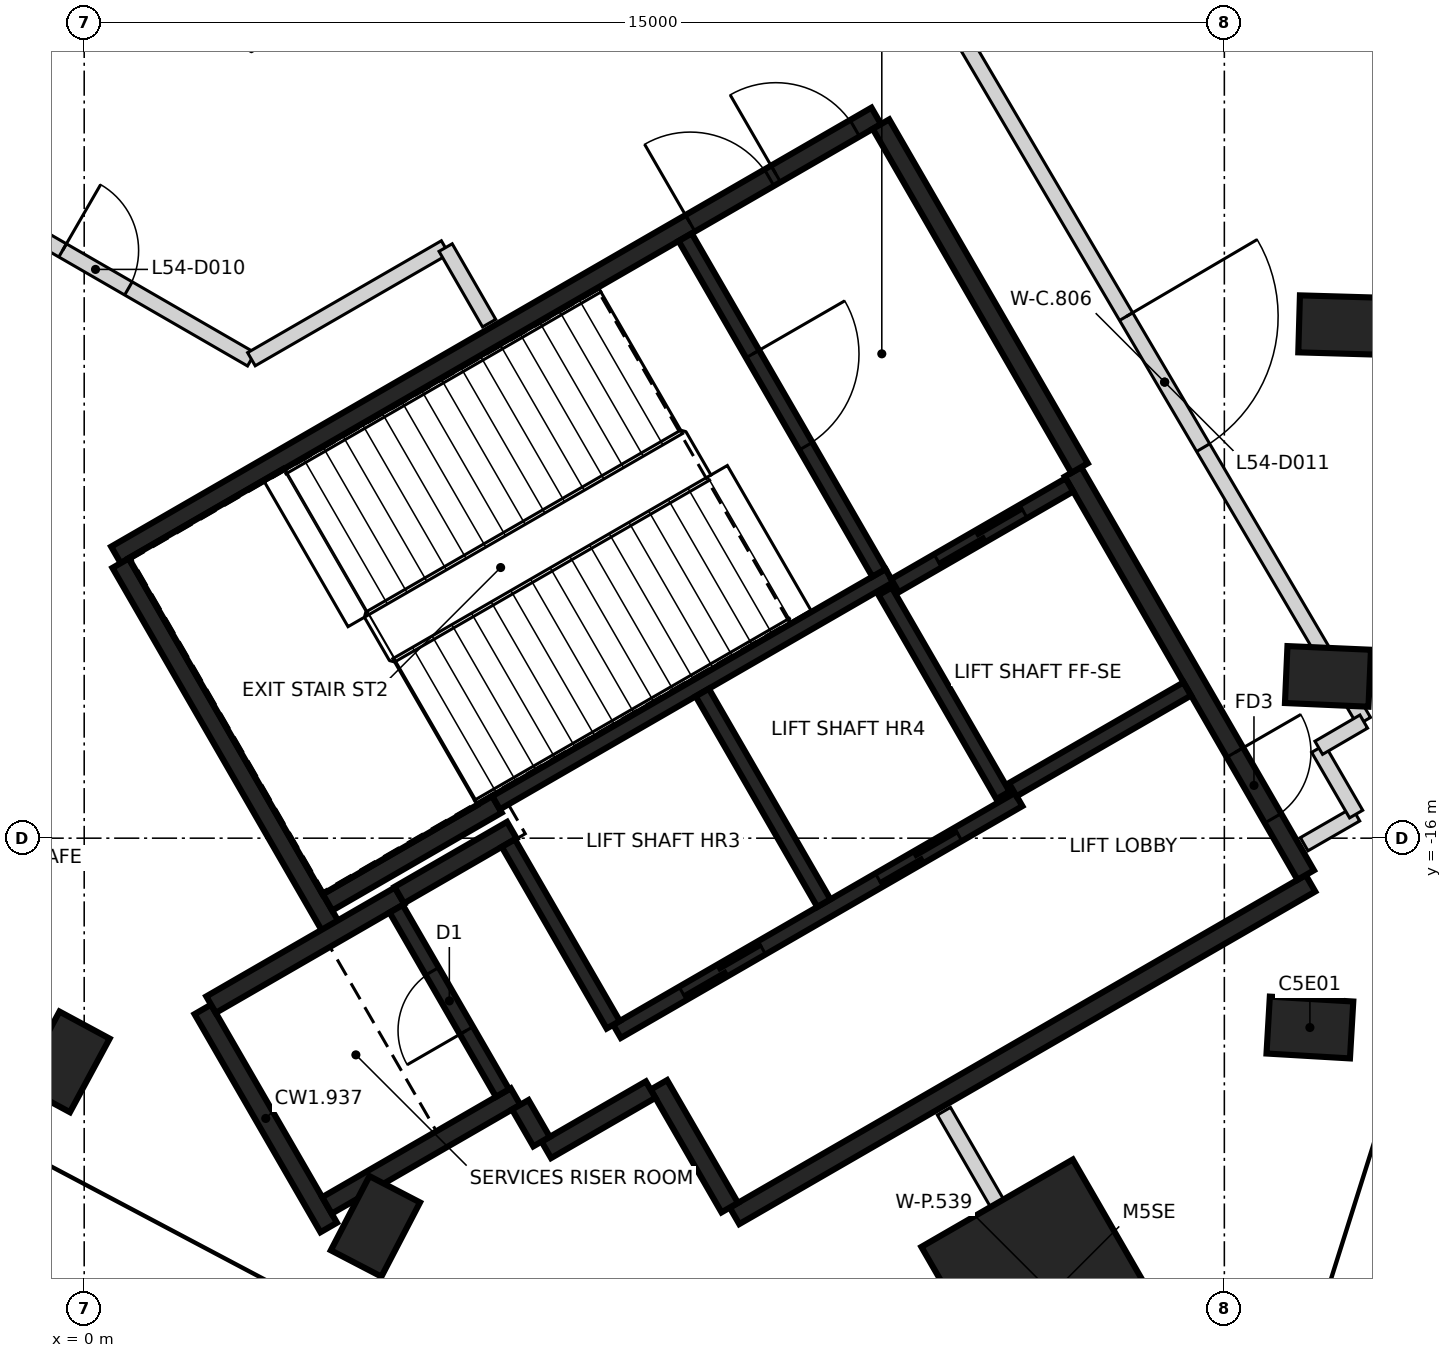
"""IFC4 building model, lengths in metres.
Left out: names, types, materials, properties, quantities, classifications, styles, units other than length and angle.
Written with IfcOpenShell. Run it as: python <this file> out.ifc"""

import sys

from ifc_helpers import new_model, si_unit, direction, frame, frame_2d, origin, origin_2d, place, context, subcontext, project, spatial, rectangle, extrude, element, fill, save


model = new_model("IFC4")
c1 = context("Model", 3, precision=1e-05, world=origin(), true_north=direction((0.0, 1.0)))
c2 = subcontext(c1, "Body", "Model", "MODEL_VIEW")
j1 = project(units=[si_unit("LENGTHUNIT", "METRE"), si_unit("PLANEANGLEUNIT", "RADIAN")], contexts=[c1])
p1 = place(None, origin())
s1 = spatial("IfcSite", under=j1, at=p1, CompositionType="ELEMENT")
p2 = place(p1, origin())
s2 = spatial("IfcBuilding", under=s1, at=p2, CompositionType="ELEMENT")
p3 = place(p2, frame((0.0, 0.0, 216.4)))
s3 = spatial("IfcBuildingStorey", under=s2, at=p3, CompositionType="ELEMENT", Elevation=216.4)
for number, where, z_axis, x_axis in (
    (1, (16.125, -18.491, -0.35), (0.0, 0.0, 1.0), (-0.998, 0.058, 0.0)),
    (2, (16.363, -13.872, -0.35), (0.0, 0.0, 1.0), (-0.999, 0.044, 0.0)),
    (3, (16.533, -9.25, -0.35), (0.0, 0.0, 1.0), (-1.0, 0.029, 0.0)),
    (4, (-0.256, -18.943, -0.35), (0.0, 0.0, 1.0), (0.475, 0.88, 0.0)),
    (5, (3.832, -21.107, -0.35), (0.0, 0.0, 1.0), (0.461, 0.887, 0.0)),
):
    element("IfcColumn", number, at=place(p3, frame(where, z_axis=z_axis, x_axis=x_axis)), inside=s3, PredefinedType="COLUMN", context=c2, shape_type="SweptSolid", body=[
        extrude(rectangle(XDim=1.1, YDim=0.75, at=origin_2d()), origin(), (0.0, 0.0, 1.0), 5.0),
    ])
p4 = place(p3, frame((12.71, -22.015, -0.35), z_axis=(0.0, 0.0, 1.0), x_axis=(-0.5, 0.866025403784, 0.0)))
e6 = element("IfcColumn", 6, at=p4, inside=s3, PredefinedType="COLUMN", context=c2, shape_type="SweptSolid", body=[
    extrude(rectangle(XDim=2.8, YDim=2.3, at=origin_2d()), origin(), (0.0, 0.0, 1.0), 5.0),
])
p5 = place(p3, frame((0.417, -12.273, 0.0), z_axis=(0.0, 0.0, 1.0), x_axis=(0.866021906294, 0.500006057782, 0.0)))
e7 = element("IfcWall", 7, at=p5, inside=s3, PredefinedType="SHEAR", context=c2, shape_type="SweptSolid", body=[
    extrude(rectangle(XDim=11.55, YDim=0.25, at=frame_2d((5.775, 0.0))), origin(), (0.0, 0.0, 1.0), 4.65),
])
p6 = place(p5, frame((10.025, 0.0, 0.0)))
e8 = element("IfcOpeningElement", 8, at=p6, cuts=e7, PredefinedType="OPENING", context=c2, shape_type="SweptSolid", body=[
    extrude(rectangle(XDim=1.2, YDim=2.1, at=frame_2d((0.6, 1.05))), frame((0.0, 0.135, 0.0), z_axis=(0.0, -1.0, 0.0), x_axis=(1.0, 0.0, 0.0)), (0.0, 0.0, 1.0), 0.27),
])
p7 = place(p5, frame((8.725, 0.0, 0.0)))
e9 = element("IfcOpeningElement", 9, at=p7, cuts=e7, PredefinedType="OPENING", context=c2, shape_type="SweptSolid", body=[
    extrude(rectangle(XDim=1.2, YDim=2.1, at=frame_2d((0.6, 1.05))), frame((0.0, 0.135, 0.0), z_axis=(0.0, -1.0, 0.0), x_axis=(1.0, 0.0, 0.0)), (0.0, 0.0, 1.0), 0.27),
])
p8 = place(p3, frame((16.133, -16.594, 0.0), z_axis=(0.0, 0.0, 1.0), x_axis=(-0.866022959057, -0.500004234368, 0.0)))
e10 = element("IfcWall", 10, at=p8, inside=s3, PredefinedType="SHEAR", context=c2, shape_type="SweptSolid", body=[
    extrude(rectangle(XDim=8.75, YDim=0.25, at=frame_2d((4.375, 0.0))), origin(), (0.0, 0.0, 1.0), 4.65),
])
p9 = place(p3, frame((13.008, -11.181, 0.0), z_axis=(0.0, 0.0, 1.0), x_axis=(0.500001955336, -0.866024274868, 0.0)))
e11 = element("IfcWall", 11, at=p9, inside=s3, PredefinedType="SHEAR", context=c2, shape_type="SweptSolid", body=[
    extrude(rectangle(XDim=6.125, YDim=0.25, at=frame_2d((3.062, 0.0))), origin(), (0.0, 0.0, 1.0), 4.65),
])
p10 = place(p9, frame((4.263, 0.0, 0.0)))
e12 = element("IfcOpeningElement", 12, at=p10, cuts=e11, PredefinedType="OPENING", context=c2, shape_type="SweptSolid", body=[
    extrude(rectangle(XDim=1.0, YDim=2.1, at=frame_2d((0.5, 1.05))), frame((0.0, 0.135, 0.0), z_axis=(0.0, -1.0, 0.0), x_axis=(1.0, 0.0, 0.0)), (0.0, 0.0, 1.0), 0.27),
])
p11 = place(p3, frame((3.235, -17.153, 0.0), z_axis=(0.0, 0.0, 1.0), x_axis=(-0.500008851346, 0.866020293397, 0.0)))
e13 = element("IfcWall", 13, at=p11, inside=s3, PredefinedType="SHEAR", context=c2, shape_type="SweptSolid", body=[
    extrude(rectangle(XDim=5.51, YDim=0.25, at=frame_2d((2.755, 0.0))), origin(), (0.0, 0.0, 1.0), 4.65),
])
p12 = place(p3, frame((10.483, -6.606, 0.0), z_axis=(0.0, 0.0, 1.0), x_axis=(0.49999885962, -0.866026062182, 0.0)))
e14 = element("IfcWall", 14, at=p12, inside=s3, PredefinedType="SHEAR", context=c2, shape_type="SweptSolid", body=[
    extrude(rectangle(XDim=5.225, YDim=0.25, at=frame_2d((2.612, 0.0))), origin(), (0.0, 0.0, 1.0), 4.65),
])
p13 = place(p3, frame((3.217, -21.122, 0.0), z_axis=(0.0, 0.0, 1.0), x_axis=(-0.499998874531, 0.866026053573, 0.0)))
e15 = element("IfcWall", 15, at=p13, inside=s3, PredefinedType="SHEAR", context=c2, shape_type="SweptSolid", body=[
    extrude(rectangle(XDim=3.313, YDim=0.25, at=frame_2d((1.656, 0.0))), origin(), (0.0, 0.0, 1.0), 4.65),
])
p14 = place(p3, frame((1.669, -18.19, 0.0), z_axis=(0.0, 0.0, 1.0), x_axis=(0.866042235819, 0.499970844928, 0.0)))
e16 = element("IfcWall", 16, at=p14, inside=s3, PredefinedType="SHEAR", context=c2, shape_type="SweptSolid", body=[
    extrude(rectangle(XDim=2.865, YDim=0.25, at=frame_2d((1.432, 0.0))), origin(), (0.0, 0.0, 1.0), 4.65),
])
p15 = place(p3, frame((5.675, -19.399, 0.0), z_axis=(0.0, 0.0, 1.0), x_axis=(-0.866026637627, -0.499997862916, 0.0)))
e17 = element("IfcWall", 17, at=p15, inside=s3, PredefinedType="SHEAR", context=c2, shape_type="SweptSolid", body=[
    extrude(rectangle(XDim=2.865, YDim=0.25, at=frame_2d((1.432, 0.0))), origin(), (0.0, 0.0, 1.0), 4.65),
])
p16 = place(p3, frame((5.431, -15.556, 0.0), z_axis=(0.0, 0.0, 1.0), x_axis=(-0.866022940537, -0.500004266446, 0.0)))
e18 = element("IfcWall", 18, at=p16, inside=s3, PredefinedType="SHEAR", context=c2, shape_type="SweptSolid", body=[
    extrude(rectangle(XDim=2.575, YDim=0.25, at=frame_2d((1.287, 0.0))), origin(), (0.0, 0.0, 1.0), 4.65),
])
p17 = place(p3, frame((8.493, -20.86, 0.0), z_axis=(0.0, 0.0, 1.0), x_axis=(-0.500039802285, 0.866002422705, 0.0)))
e19 = element("IfcWall", 19, at=p17, inside=s3, PredefinedType="SHEAR", context=c2, shape_type="SweptSolid", body=[
    extrude(rectangle(XDim=1.865, YDim=0.25, at=frame_2d((0.932, 0.0))), origin(), (0.0, 0.0, 1.0), 4.65),
])
p18 = place(p3, frame((4.145, -16.749, 0.0), z_axis=(0.0, 0.0, 1.0), x_axis=(0.866038183914, 0.499977863513, 0.0)))
e20 = element("IfcWall", 20, at=p18, inside=s3, PredefinedType="SHEAR", context=c2, shape_type="SweptSolid", body=[
    extrude(rectangle(XDim=1.71, YDim=0.25, at=frame_2d((0.855, 0.0))), origin(), (0.0, 0.0, 1.0), 4.65),
])
p19 = place(p3, frame((7.452, -19.308, 0.0), z_axis=(0.0, 0.0, 1.0), x_axis=(-0.866044474677, -0.49996696679, 0.0)))
e21 = element("IfcWall", 21, at=p19, inside=s3, PredefinedType="SHEAR", context=c2, shape_type="SweptSolid", body=[
    extrude(rectangle(XDim=1.584, YDim=0.25, at=frame_2d((0.792, 0.0))), origin(), (0.0, 0.0, 1.0), 4.65),
])
p20 = place(p3, frame((6.017, -19.992, 0.0), z_axis=(0.0, 0.0, 1.0), x_axis=(-0.500364886717, 0.865814633822, 0.0)))
e22 = element("IfcWall", 22, at=p20, inside=s3, PredefinedType="SHEAR", context=c2, shape_type="SweptSolid", body=[
    extrude(rectangle(XDim=0.559, YDim=0.25, at=frame_2d((0.28, 0.0))), origin(), (0.0, 0.0, 1.0), 4.65),
])
p21 = place(p3, frame((5.419, -15.534, 0.0), z_axis=(0.0, 0.0, 1.0), x_axis=(0.866029065029, 0.499993658486, 0.0)))
e23 = element("IfcWall", 23, at=p21, inside=s3, PredefinedType="SHEAR", context=c2, shape_type="SweptSolid", body=[
    extrude(rectangle(XDim=5.974, YDim=0.2, at=frame_2d((2.987, 0.0))), origin(), (0.0, 0.0, 1.0), 4.65),
])
p22 = place(p3, frame((7.01, -18.542, 0.0), z_axis=(0.0, 0.0, 1.0), x_axis=(0.866030299012, 0.499991521122, 0.0)))
e24 = element("IfcWall", 24, at=p22, inside=s3, PredefinedType="SHEAR", context=c2, shape_type="SweptSolid", body=[
    extrude(rectangle(XDim=6.1, YDim=0.2, at=frame_2d((3.05, 0.0))), origin(), (0.0, 0.0, 1.0), 4.65),
])
p23 = place(p22, frame((1.0, 0.0, 0.0)))
e25 = element("IfcOpeningElement", 25, at=p23, cuts=e24, PredefinedType="OPENING", context=c2, shape_type="SweptSolid", body=[
    extrude(rectangle(XDim=1.2, YDim=2.1, at=frame_2d((0.6, 1.05))), frame((0.0, 0.11, 0.0), z_axis=(0.0, -1.0, 0.0), x_axis=(1.0, 0.0, 0.0)), (0.0, 0.0, 1.0), 0.22),
])
p24 = place(p22, frame((3.982, 0.0, 0.0)))
e26 = element("IfcOpeningElement", 26, at=p24, cuts=e24, PredefinedType="OPENING", context=c2, shape_type="SweptSolid", body=[
    extrude(rectangle(XDim=1.2, YDim=2.1, at=frame_2d((0.6, 1.05))), frame((0.0, 0.11, 0.0), z_axis=(0.0, -1.0, 0.0), x_axis=(1.0, 0.0, 0.0)), (0.0, 0.0, 1.0), 0.22),
])
p25 = place(p3, frame((7.906, -8.094, 0.0), z_axis=(0.0, 0.0, 1.0), x_axis=(0.500027839223, -0.866009330205, 0.0)))
e27 = element("IfcWall", 27, at=p25, inside=s3, PredefinedType="SHEAR", context=c2, shape_type="SweptSolid", body=[
    extrude(rectangle(XDim=5.098, YDim=0.2, at=frame_2d((2.549, 0.0))), origin(), (0.0, 0.0, 1.0), 4.65),
])
p26 = place(p25, frame((1.774, 0.0, 0.0)))
e28 = element("IfcOpeningElement", 28, at=p26, cuts=e27, PredefinedType="OPENING", context=c2, shape_type="SweptSolid", body=[
    extrude(rectangle(XDim=1.4, YDim=2.1, at=frame_2d((0.7, 1.05))), frame((0.0, 0.11, 0.0), z_axis=(0.0, -1.0, 0.0), x_axis=(1.0, 0.0, 0.0)), (0.0, 0.0, 1.0), 0.22),
])
p27 = place(p3, frame((8.132, -14.084, 0.0), z_axis=(0.0, 0.0, 1.0), x_axis=(0.499997778408, -0.866026686418, 0.0)))
e29 = element("IfcWall", 29, at=p27, inside=s3, PredefinedType="SHEAR", context=c2, shape_type="SweptSolid", body=[
    extrude(rectangle(XDim=3.198, YDim=0.2, at=frame_2d((1.599, 0.0))), origin(), (0.0, 0.0, 1.0), 4.65),
])
p28 = place(p3, frame((5.503, -19.352, 0.0), z_axis=(0.0, 0.0, 1.0), x_axis=(-0.499986818241, 0.866033014143, 0.0)))
e30 = element("IfcWall", 30, at=p28, inside=s3, PredefinedType="SHEAR", context=c2, shape_type="SweptSolid", body=[
    extrude(rectangle(XDim=2.798, YDim=0.2, at=frame_2d((1.399, 0.0))), origin(), (0.0, 0.0, 1.0), 4.65),
])
p29 = place(p28, frame((0.949, 0.0, 0.0)))
e31 = element("IfcOpeningElement", 31, at=p29, cuts=e30, PredefinedType="OPENING", context=c2, shape_type="SweptSolid", body=[
    extrude(rectangle(XDim=0.9, YDim=2.1, at=frame_2d((0.45, 1.05))), frame((0.0, 0.11, 0.0), z_axis=(0.0, -1.0, 0.0), x_axis=(1.0, 0.0, 0.0)), (0.0, 0.0, 1.0), 0.22),
])
p30 = place(p3, frame((6.96, -18.455, 0.0), z_axis=(0.0, 0.0, 1.0), x_axis=(-0.499926705758, 0.866067716099, 0.0)))
e32 = element("IfcWall", 32, at=p30, inside=s3, PredefinedType="SHEAR", context=c2, shape_type="SweptSolid", body=[
    extrude(rectangle(XDim=2.759, YDim=0.2, at=frame_2d((1.38, 0.0))), origin(), (0.0, 0.0, 1.0), 4.65),
])
p31 = place(p3, frame((12.088, -15.437, 0.0), z_axis=(0.0, 0.0, 1.0), x_axis=(-0.500026960575, 0.86600983753, 0.0)))
e33 = element("IfcWall", 33, at=p31, inside=s3, PredefinedType="SHEAR", context=c2, shape_type="SweptSolid", body=[
    extrude(rectangle(XDim=3.1, YDim=0.2, at=frame_2d((1.55, 0.0))), origin(), (0.0, 0.0, 1.0), 4.65),
])
p32 = place(p3, frame((10.666, -12.678, 0.0), z_axis=(0.0, 0.0, 1.0), x_axis=(0.866018407898, 0.500012117035, 0.0)))
e34 = element("IfcWall", 34, at=p32, inside=s3, PredefinedType="SHEAR", context=c2, shape_type="SweptSolid", body=[
    extrude(rectangle(XDim=2.651, YDim=0.2, at=frame_2d((1.325, 0.0))), origin(), (0.0, 0.0, 1.0), 4.65),
])
p33 = place(p32, frame((0.652, 0.0, 0.0)))
e35 = element("IfcOpeningElement", 35, at=p33, cuts=e34, PredefinedType="OPENING", context=c2, shape_type="SweptSolid", body=[
    extrude(rectangle(XDim=1.3, YDim=2.1, at=frame_2d((0.65, 1.05))), frame((0.0, 0.11, 0.0), z_axis=(0.0, -1.0, 0.0), x_axis=(1.0, 0.0, 0.0)), (0.0, 0.0, 1.0), 0.22),
])
p34 = place(p3, frame((14.512, -14.037, 0.0), z_axis=(0.0, 0.0, 1.0), x_axis=(-0.866018407898, -0.500012117035, 0.0)))
e36 = element("IfcWall", 36, at=p34, inside=s3, PredefinedType="SHEAR", context=c2, shape_type="SweptSolid", body=[
    extrude(rectangle(XDim=2.651, YDim=0.2, at=frame_2d((1.325, 0.0))), origin(), (0.0, 0.0, 1.0), 4.65),
])
p35 = place(p3, frame((-7.188, -4.279, 0.0), z_axis=(0.0, 0.0, 1.0), x_axis=(0.865917749919, -0.500186415625, 0.0)))
e37 = element("IfcWall", 37, at=p35, inside=s3, PredefinedType="PARTITIONING", context=c2, shape_type="SweptSolid", body=[
    extrude(rectangle(XDim=10.84, YDim=0.2, at=frame_2d((5.42, 0.0))), origin(), (0.0, 0.0, 1.0), 4.65),
])
p36 = place(p35, frame((0.534, 0.0, 0.0)))
e38 = element("IfcOpeningElement", 38, at=p36, cuts=e37, PredefinedType="OPENING", context=c2, shape_type="SweptSolid", body=[
    extrude(rectangle(XDim=1.0, YDim=2.1, at=frame_2d((0.5, 1.05))), frame((0.0, 0.11, 0.0), z_axis=(0.0, -1.0, 0.0), x_axis=(1.0, 0.0, 0.0)), (0.0, 0.0, 1.0), 0.22),
])
p37 = place(p35, frame((2.672, 0.0, 0.0)))
e39 = element("IfcOpeningElement", 39, at=p37, cuts=e37, PredefinedType="OPENING", context=c2, shape_type="SweptSolid", body=[
    extrude(rectangle(XDim=0.8, YDim=2.1, at=frame_2d((0.4, 1.05))), frame((0.0, 0.11, 0.0), z_axis=(0.0, -1.0, 0.0), x_axis=(1.0, 0.0, 0.0)), (0.0, 0.0, 1.0), 0.22),
])
p38 = place(p35, frame((4.702, 0.0, 0.0)))
e40 = element("IfcOpeningElement", 40, at=p38, cuts=e37, PredefinedType="OPENING", context=c2, shape_type="SweptSolid", body=[
    extrude(rectangle(XDim=0.8, YDim=2.1, at=frame_2d((0.4, 1.05))), frame((0.0, 0.11, 0.0), z_axis=(0.0, -1.0, 0.0), x_axis=(1.0, 0.0, 0.0)), (0.0, 0.0, 1.0), 0.22),
])
p39 = place(p35, frame((7.973, 0.0, 0.0)))
e41 = element("IfcOpeningElement", 41, at=p39, cuts=e37, PredefinedType="OPENING", context=c2, shape_type="SweptSolid", body=[
    extrude(rectangle(XDim=1.0, YDim=2.1, at=frame_2d((0.5, 1.05))), frame((0.0, 0.11, 0.0), z_axis=(0.0, -1.0, 0.0), x_axis=(1.0, 0.0, 0.0)), (0.0, 0.0, 1.0), 0.22),
])
p40 = place(p3, frame((2.2, -9.699, 0.0), z_axis=(0.0, 0.0, 1.0), x_axis=(0.865993587304, 0.500055103712, 0.0)))
e42 = element("IfcWall", 42, at=p40, inside=s3, PredefinedType="PARTITIONING", context=c2, shape_type="SweptSolid", body=[
    extrude(rectangle(XDim=2.944, YDim=0.2, at=frame_2d((1.472, 0.0))), origin(), (0.0, 0.0, 1.0), 4.65),
])
p41 = place(p3, frame((4.755, -8.23, 0.0), z_axis=(0.0, 0.0, 1.0), x_axis=(0.498954759956, -0.866628032963, 0.0)))
e43 = element("IfcWall", 43, at=p41, inside=s3, PredefinedType="PARTITIONING", context=c2, shape_type="SweptSolid", body=[
    extrude(rectangle(XDim=1.147, YDim=0.2, at=frame_2d((0.574, 0.0))), origin(), (0.0, 0.0, 1.0), 4.65),
])
p42 = place(p3, frame((11.592, -5.538, 0.0), z_axis=(0.0, 0.0, 1.0), x_axis=(0.506701587767, -0.86212151171, 0.0)))
e44 = element("IfcWall", 44, at=p42, inside=s3, PredefinedType="PARTITIONING", context=c2, shape_type="SweptSolid", body=[
    extrude(rectangle(XDim=10.351, YDim=0.2, at=frame_2d((5.176, 0.0))), origin(), (0.0, 0.0, 1.0), 3.75),
])
p43 = place(p42, frame((4.176, 0.0, 0.0)))
e45 = element("IfcOpeningElement", 45, at=p43, cuts=e44, PredefinedType="OPENING", context=c2, shape_type="SweptSolid", body=[
    extrude(rectangle(XDim=2.0, YDim=2.1, at=frame_2d((1.0, 1.05))), frame((0.0, 0.11, 0.0), z_axis=(0.0, -1.0, 0.0), x_axis=(1.0, 0.0, 0.0)), (0.0, 0.0, 1.0), 0.22),
])
p44 = place(p3, frame((16.05, -16.08, 0.0), z_axis=(0.0, 0.0, 1.0), x_axis=(0.866325177067, 0.499480417614, 0.0)))
e46 = element("IfcWall", 46, at=p44, inside=s3, PredefinedType="PARTITIONING", context=c2, shape_type="SweptSolid", body=[
    extrude(rectangle(XDim=0.786, YDim=0.2, at=frame_2d((0.393, 0.0))), origin(), (0.0, 0.0, 1.0), 3.75),
])
p45 = place(p3, frame((16.235, -14.821, 0.0), z_axis=(0.0, 0.0, 1.0), x_axis=(0.500804343594, -0.86556051749, 0.0)))
e47 = element("IfcWall", 47, at=p45, inside=s3, PredefinedType="PARTITIONING", context=c2, shape_type="SweptSolid", body=[
    extrude(rectangle(XDim=0.996, YDim=0.2, at=frame_2d((0.498, 0.0))), origin(), (0.0, 0.0, 1.0), 3.75),
])
p46 = place(p3, frame((16.242, -14.811, 0.0), z_axis=(0.0, 0.0, 1.0), x_axis=(0.864024330605, 0.503450053255, 0.0)))
e48 = element("IfcWall", 48, at=p46, inside=s3, PredefinedType="PARTITIONING", context=c2, shape_type="SweptSolid", body=[
    extrude(rectangle(XDim=0.685, YDim=0.2, at=frame_2d((0.343, 0.0))), origin(), (0.0, 0.0, 1.0), 3.75),
])
p47 = place(p3, frame((11.311, -19.592, 0.0), z_axis=(0.0, 0.0, 1.0), x_axis=(0.500132351176, -0.865948977311, 0.0)))
e49 = element("IfcWall", 49, at=p47, inside=s3, PredefinedType="PARTITIONING", context=c2, shape_type="SweptSolid", body=[
    extrude(rectangle(XDim=5.293, YDim=0.2, at=frame_2d((2.646, 0.0))), origin(), (0.0, 0.0, 1.0), 4.65),
])
p48 = place(p33, origin())
e50 = element("IfcDoor", 50, at=p48, inside=s3, OperationType="SLIDING_TO_LEFT", PredefinedType="DOOR", context=c2, shape_type="SweptSolid", body=[
    extrude(rectangle(XDim=1.3, YDim=2.1, at=frame_2d((0.65, 1.05))), frame((0.0, 0.025, 0.0), z_axis=(0.0, -1.0, 0.0), x_axis=(1.0, 0.0, 0.0)), (0.0, 0.0, 1.0), 0.05),
])
fill(e35, e50)
p49 = place(p23, origin())
e51 = element("IfcDoor", 51, at=p49, inside=s3, OperationType="DOUBLE_DOOR_SLIDING", PredefinedType="DOOR", context=c2, shape_type="SweptSolid", body=[
    extrude(rectangle(XDim=1.2, YDim=2.1, at=frame_2d((0.6, 1.05))), frame((0.0, 0.025, 0.0), z_axis=(0.0, -1.0, 0.0), x_axis=(1.0, 0.0, 0.0)), (0.0, 0.0, 1.0), 0.05),
])
fill(e25, e51)
p50 = place(p24, origin())
e52 = element("IfcDoor", 52, at=p50, inside=s3, OperationType="DOUBLE_DOOR_SLIDING", PredefinedType="DOOR", context=c2, shape_type="SweptSolid", body=[
    extrude(rectangle(XDim=1.2, YDim=2.1, at=frame_2d((0.6, 1.05))), frame((0.0, 0.025, 0.0), z_axis=(0.0, -1.0, 0.0), x_axis=(1.0, 0.0, 0.0)), (0.0, 0.0, 1.0), 0.05),
])
fill(e26, e52)
p51 = place(p10, origin())
e53 = element("IfcDoor", 53, at=p51, inside=s3, OperationType="SINGLE_SWING_LEFT", PredefinedType="DOOR", context=c2, shape_type="SweptSolid", body=[
    extrude(rectangle(XDim=1.0, YDim=2.1, at=frame_2d((0.5, 1.05))), frame((0.0, 0.025, 0.0), z_axis=(0.0, -1.0, 0.0), x_axis=(1.0, 0.0, 0.0)), (0.0, 0.0, 1.0), 0.05),
])
fill(e12, e53)
p52 = place(p6, origin())
e54 = element("IfcDoor", 54, at=p52, inside=s3, OperationType="SINGLE_SWING_LEFT", PredefinedType="DOOR", context=c2, shape_type="SweptSolid", body=[
    extrude(rectangle(XDim=1.2, YDim=2.1, at=frame_2d((0.6, 1.05))), frame((0.0, 0.025, 0.0), z_axis=(0.0, -1.0, 0.0), x_axis=(1.0, 0.0, 0.0)), (0.0, 0.0, 1.0), 0.05),
])
fill(e8, e54)
p53 = place(p7, origin())
e55 = element("IfcDoor", 55, at=p53, inside=s3, OperationType="SINGLE_SWING_RIGHT", PredefinedType="DOOR", context=c2, shape_type="SweptSolid", body=[
    extrude(rectangle(XDim=1.2, YDim=2.1, at=frame_2d((0.6, 1.05))), frame((0.0, 0.025, 0.0), z_axis=(0.0, -1.0, 0.0), x_axis=(1.0, 0.0, 0.0)), (0.0, 0.0, 1.0), 0.05),
])
fill(e9, e55)
p54 = place(p26, origin())
e56 = element("IfcDoor", 56, at=p54, inside=s3, OperationType="SINGLE_SWING_LEFT", PredefinedType="DOOR", context=c2, shape_type="SweptSolid", body=[
    extrude(rectangle(XDim=1.4, YDim=2.1, at=frame_2d((0.7, 1.05))), frame((0.0, 0.025, 0.0), z_axis=(0.0, -1.0, 0.0), x_axis=(1.0, 0.0, 0.0)), (0.0, 0.0, 1.0), 0.05),
])
fill(e28, e56)
p55 = place(p29, origin())
e57 = element("IfcDoor", 57, at=p55, inside=s3, OperationType="SINGLE_SWING_RIGHT", PredefinedType="DOOR", context=c2, shape_type="SweptSolid", body=[
    extrude(rectangle(XDim=0.9, YDim=2.1, at=frame_2d((0.45, 1.05))), frame((0.0, 0.025, 0.0), z_axis=(0.0, -1.0, 0.0), x_axis=(1.0, 0.0, 0.0)), (0.0, 0.0, 1.0), 0.05),
])
fill(e31, e57)
p56 = place(p39, frame((1.0, 0.0, 0.0), z_axis=(0.0, 0.0, 1.0), x_axis=(-1.0, 0.0, 0.0)))
e58 = element("IfcDoor", 58, at=p56, inside=s3, OperationType="SINGLE_SWING_LEFT", PredefinedType="DOOR", context=c2, shape_type="SweptSolid", body=[
    extrude(rectangle(XDim=1.0, YDim=2.1, at=frame_2d((0.5, 1.05))), frame((0.0, 0.025, 0.0), z_axis=(0.0, -1.0, 0.0), x_axis=(1.0, 0.0, 0.0)), (0.0, 0.0, 1.0), 0.05),
])
fill(e41, e58)
p57 = place(p43, origin())
e59 = element("IfcDoor", 59, at=p57, inside=s3, OperationType="DOUBLE_DOOR_SINGLE_SWING", PredefinedType="DOOR", context=c2, shape_type="SweptSolid", body=[
    extrude(rectangle(XDim=2.0, YDim=2.1, at=frame_2d((1.0, 1.05))), frame((0.0, 0.025, 0.0), z_axis=(0.0, -1.0, 0.0), x_axis=(1.0, 0.0, 0.0)), (0.0, 0.0, 1.0), 0.05),
])
fill(e45, e59)
save(model, sys.argv[1])
